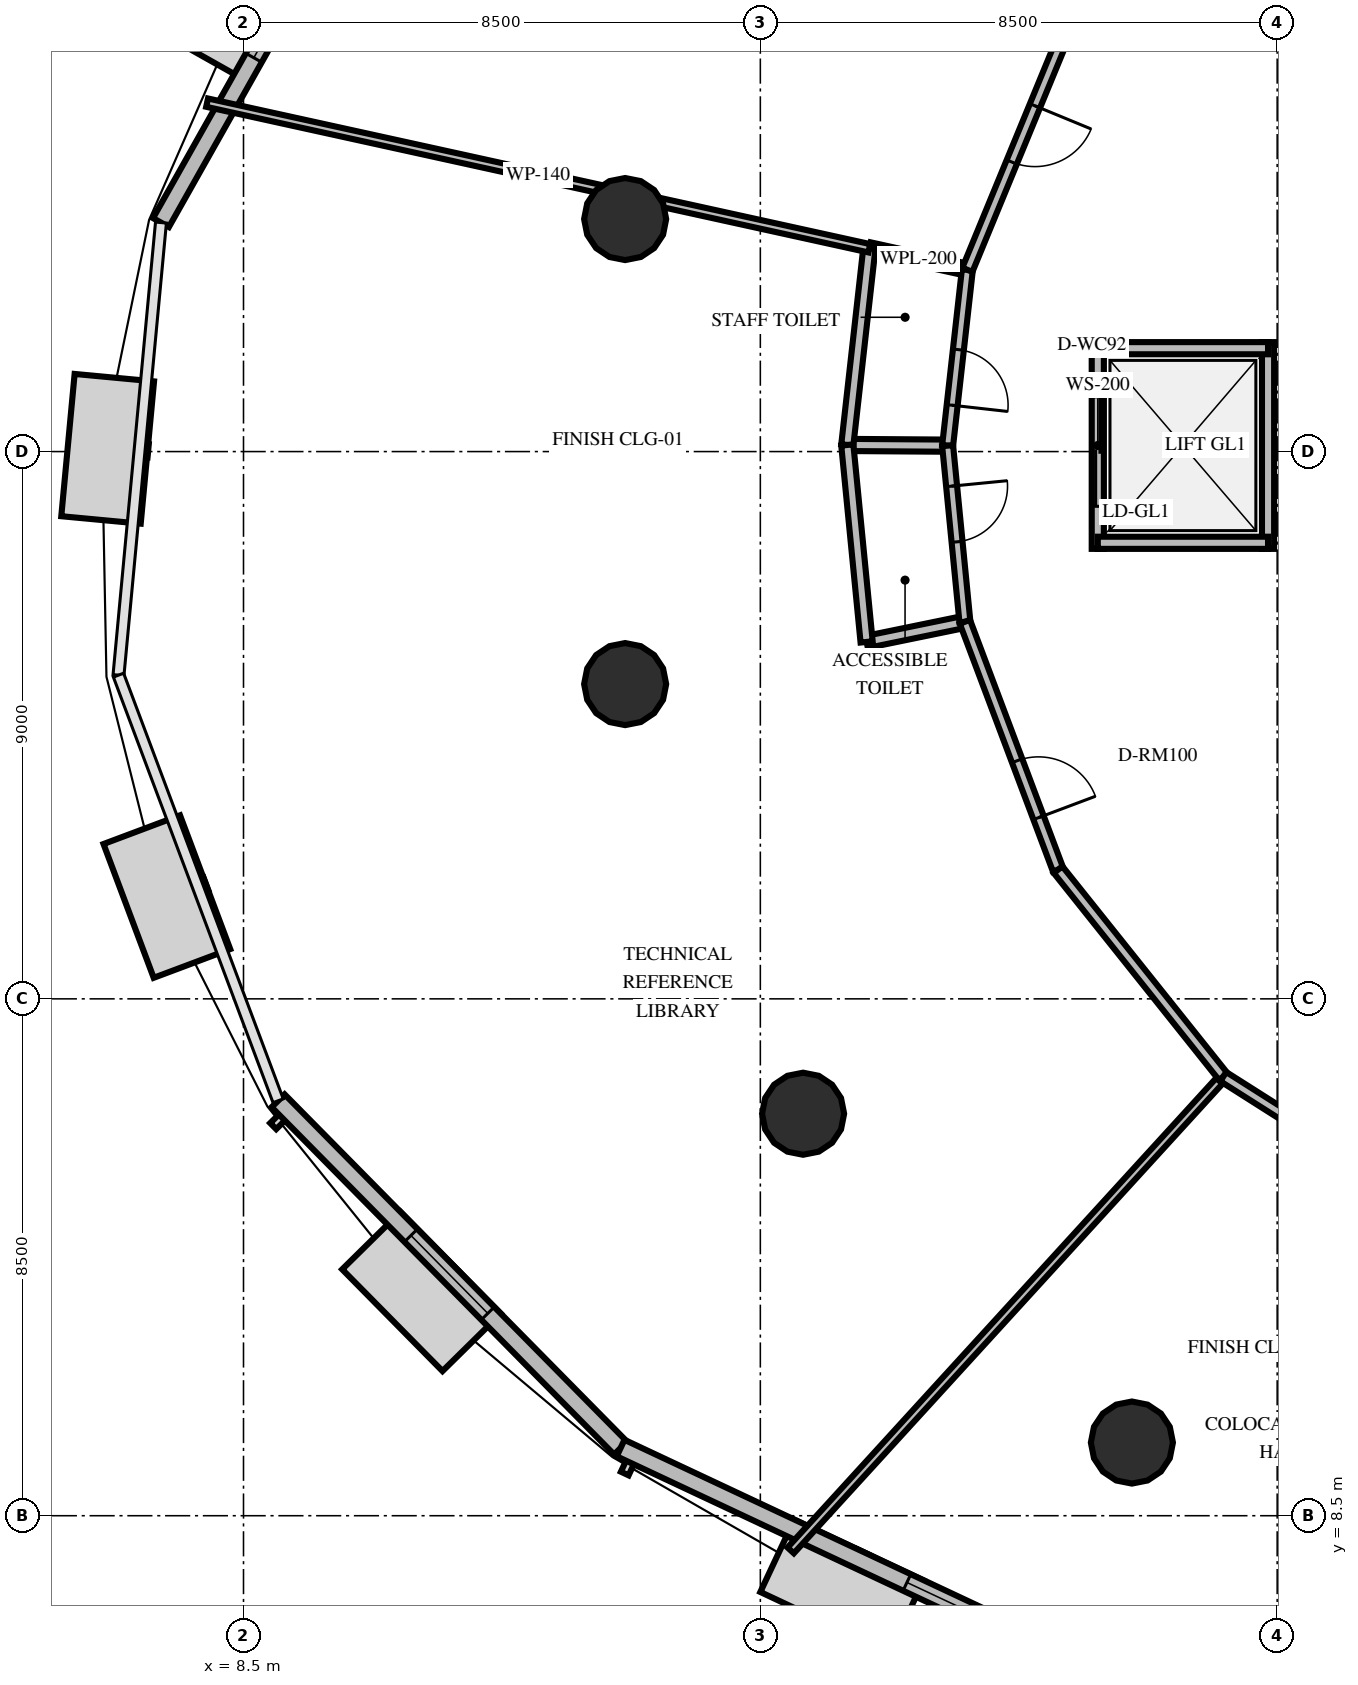
"""IFC4 building model, lengths in metres.
Left out: names, types, materials, properties, quantities, classifications, styles, units other than length and angle.
Written with IfcOpenShell. Run it as: python <this file> out.ifc"""

import sys

from ifc_helpers import new_model, si_unit, direction, frame, frame_2d, origin, origin_2d, place, context, subcontext, project, spatial, rectangle, circle, extrude, element, fill, save


model = new_model("IFC4")
c1 = context("Model", 3, precision=1e-05, world=origin(), true_north=direction((0.0, 1.0)))
c2 = subcontext(c1, "Body", "Model", "MODEL_VIEW")
j1 = project(units=[si_unit("LENGTHUNIT", "METRE"), si_unit("PLANEANGLEUNIT", "RADIAN")], contexts=[c1])
p1 = place(None, origin())
s1 = spatial("IfcSite", under=j1, at=p1, CompositionType="ELEMENT")
p2 = place(p1, origin())
s2 = spatial("IfcBuilding", under=s1, at=p2, CompositionType="ELEMENT")
p3 = place(p2, frame((0.0, 0.0, 63.6)))
s3 = spatial("IfcBuildingStorey", under=s2, at=p3, CompositionType="ELEMENT", Elevation=63.6)
for number, where, z_axis, x_axis in (
    (1, (14.777, 29.824, 0.0), (0.0, 0.0, 1.0), (1.0, 0.0, 0.0)),
    (2, (14.777, 22.176, 0.0), (0.0, 0.0, 1.0), (1.0, 0.0, 0.0)),
    (3, (17.703, 15.111, 0.0), (0.0, 0.0, 1.0), (1.0, 0.0, 0.0)),
    (4, (23.111, 9.703, 0.0), (0.0, 0.0, 1.0), (1.0, 0.0, 0.0)),
):
    element("IfcColumn", number, at=place(p3, frame(where, z_axis=z_axis, x_axis=x_axis)), inside=s3, PredefinedType="COLUMN", context=c2, shape_type="SweptSolid", body=[
        extrude(circle(Radius=0.675, at=origin_2d()), origin(), (0.0, 0.0, 1.0), 4.2),
    ])
p4 = place(p3, frame((11.08, 36.755, 0.0), z_axis=(0.0, 0.0, 1.0), x_axis=(-0.490895470353, -0.871218478446, 0.0)))
e5 = element("IfcWall", 5, at=p4, inside=s3, PredefinedType="SOLIDWALL", context=c2, shape_type="SweptSolid", body=[
    extrude(rectangle(XDim=8.021, YDim=0.3, at=frame_2d((4.011, 0.0))), origin(), (0.0, 0.0, 1.0), 3.0),
])
p5 = place(p4, frame((3.111, 0.0, 0.8)))
e6 = element("IfcOpeningElement", 6, at=p5, cuts=e5, PredefinedType="OPENING", context=c2, shape_type="SweptSolid", body=[
    extrude(rectangle(XDim=1.8, YDim=1.95, at=frame_2d((0.9, 0.975))), frame((0.0, 0.16, 0.0), z_axis=(0.0, -1.0, 0.0), x_axis=(1.0, 0.0, 0.0)), (0.0, 0.0, 1.0), 0.32),
])
p6 = place(p3, frame((9.07, 15.324, 0.0), z_axis=(0.0, 0.0, 1.0), x_axis=(0.702143738973, -0.712035230744, 0.0)))
e7 = element("IfcWall", 7, at=p6, inside=s3, PredefinedType="SOLIDWALL", context=c2, shape_type="SweptSolid", body=[
    extrude(rectangle(XDim=8.022, YDim=0.3, at=frame_2d((4.011, 0.0))), origin(), (0.0, 0.0, 1.0), 3.0),
])
p7 = place(p6, frame((3.111, 0.0, 0.8)))
e8 = element("IfcOpeningElement", 8, at=p7, cuts=e7, PredefinedType="OPENING", context=c2, shape_type="SweptSolid", body=[
    extrude(rectangle(XDim=1.8, YDim=1.95, at=frame_2d((0.9, 0.975))), frame((0.0, 0.16, 0.0), z_axis=(0.0, -1.0, 0.0), x_axis=(1.0, 0.0, 0.0)), (0.0, 0.0, 1.0), 0.32),
])
p8 = place(p3, frame((14.702, 9.612, 0.0), z_axis=(0.0, 0.0, 1.0), x_axis=(0.905289465516, -0.424795225522, 0.0)))
e9 = element("IfcWall", 9, at=p8, inside=s3, PredefinedType="SOLIDWALL", context=c2, shape_type="SweptSolid", body=[
    extrude(rectangle(XDim=8.793, YDim=0.3, at=frame_2d((4.396, 0.0))), origin(), (0.0, 0.0, 1.0), 3.0),
])
p9 = place(p8, frame((5.202, 0.0, 0.8)))
e10 = element("IfcOpeningElement", 10, at=p9, cuts=e9, PredefinedType="OPENING", context=c2, shape_type="SweptSolid", body=[
    extrude(rectangle(XDim=1.8, YDim=1.95, at=frame_2d((0.9, 0.975))), frame((0.0, 0.16, 0.0), z_axis=(0.0, -1.0, 0.0), x_axis=(1.0, 0.0, 0.0)), (0.0, 0.0, 1.0), 0.32),
])
p10 = place(p3, frame((22.55, 24.4, 0.0), z_axis=(0.0, 0.0, 1.0), x_axis=(0.0, 1.0, 0.0)))
e11 = element("IfcWall", 11, at=p10, inside=s3, PredefinedType="SOLIDWALL", context=c2, shape_type="SweptSolid", body=[
    extrude(rectangle(XDim=3.4, YDim=0.2, at=frame_2d((1.7, 0.0))), origin(), (0.0, 0.0, 1.0), 3.0),
])
p11 = place(p10, frame((0.7, 0.0, 0.0)))
e12 = element("IfcOpeningElement", 12, at=p11, cuts=e11, PredefinedType="OPENING", context=c2, shape_type="SweptSolid", body=[
    extrude(rectangle(XDim=1.8, YDim=2.4, at=frame_2d((0.9, 1.2))), frame((0.0, 0.11, 0.0), z_axis=(0.0, -1.0, 0.0), x_axis=(1.0, 0.0, 0.0)), (0.0, 0.0, 1.0), 0.22),
])
p12 = place(p3, frame((25.35, 24.4, 0.0), z_axis=(0.0, 0.0, 1.0), x_axis=(0.0, 1.0, 0.0)))
e13 = element("IfcWall", 13, at=p12, inside=s3, PredefinedType="SOLIDWALL", context=c2, shape_type="SweptSolid", body=[
    extrude(rectangle(XDim=3.4, YDim=0.2, at=frame_2d((1.7, 0.0))), origin(), (0.0, 0.0, 1.0), 3.0),
])
for number, where, z_axis, x_axis in (
    (14, (22.55, 24.5, 0.0), (0.0, 0.0, 1.0), (1.0, 0.0, 0.0)),
    (15, (22.55, 27.7, 0.0), (0.0, 0.0, 1.0), (1.0, 0.0, 0.0)),
):
    element("IfcWall", number, at=place(p3, frame(where, z_axis=z_axis, x_axis=x_axis)), inside=s3, PredefinedType="SOLIDWALL", context=c2, shape_type="SweptSolid", body=[
        extrude(rectangle(XDim=2.8, YDim=0.2, at=frame_2d((1.4, 0.0))), origin(), (0.0, 0.0, 1.0), 3.0),
    ])
p13 = place(p3, frame((20.405, 28.989, 0.0), z_axis=(0.0, 0.0, 1.0), x_axis=(-0.976651296643, 0.21483073515, 0.0)))
e16 = element("IfcWall", 16, at=p13, inside=s3, PredefinedType="PLUMBINGWALL", context=c2, shape_type="SweptSolid", body=[
    extrude(rectangle(XDim=1.65, YDim=0.2, at=frame_2d((0.825, 0.0))), origin(), (0.0, 0.0, 1.0), 3.0),
])
p14 = place(p3, frame((20.08, 26.097, 0.0), z_axis=(0.0, 0.0, 1.0), x_axis=(-0.99997581681, 0.006954552144, 0.0)))
e17 = element("IfcWall", 17, at=p14, inside=s3, PredefinedType="PLUMBINGWALL", context=c2, shape_type="SweptSolid", body=[
    extrude(rectangle(XDim=1.65, YDim=0.2, at=frame_2d((0.825, 0.0))), origin(), (0.0, 0.0, 1.0), 3.0),
])
p15 = place(p3, frame((18.793, 29.344, 0.0), z_axis=(0.0, 0.0, 1.0), x_axis=(-0.111452219872, -0.993769793607, 0.0)))
e18 = element("IfcWall", 18, at=p15, inside=s3, PredefinedType="PLUMBINGWALL", context=c2, shape_type="SweptSolid", body=[
    extrude(rectangle(XDim=3.255, YDim=0.2, at=frame_2d((1.627, 0.0))), origin(), (0.0, 0.0, 1.0), 3.0),
])
p16 = place(p3, frame((20.405, 28.989, 0.0), z_axis=(0.0, 0.0, 1.0), x_axis=(-0.111499619196, -0.993764476583, 0.0)))
e19 = element("IfcWall", 19, at=p16, inside=s3, PredefinedType="PARTITIONING", context=c2, shape_type="SweptSolid", body=[
    extrude(rectangle(XDim=2.91, YDim=0.18, at=frame_2d((1.455, 0.0))), origin(), (0.0, 0.0, 1.0), 3.0),
])
p17 = place(p16, frame((1.321, 0.0, 0.0)))
e20 = element("IfcOpeningElement", 20, at=p17, cuts=e19, PredefinedType="OPENING", context=c2, shape_type="SweptSolid", body=[
    extrude(rectangle(XDim=0.92, YDim=2.1, at=frame_2d((0.46, 1.05))), frame((0.0, 0.1, 0.0), z_axis=(0.0, -1.0, 0.0), x_axis=(1.0, 0.0, 0.0)), (0.0, 0.0, 1.0), 0.2),
])
p18 = place(p3, frame((20.364, 23.201, 0.0), z_axis=(0.0, 0.0, 1.0), x_axis=(-0.979572068013, -0.201093420004, 0.0)))
e21 = element("IfcWall", 21, at=p18, inside=s3, PredefinedType="PLUMBINGWALL", context=c2, shape_type="SweptSolid", body=[
    extrude(rectangle(XDim=1.65, YDim=0.2, at=frame_2d((0.825, 0.0))), origin(), (0.0, 0.0, 1.0), 3.0),
])
p19 = place(p3, frame((18.43, 26.109, 0.0), z_axis=(0.0, 0.0, 1.0), x_axis=(0.097580164018, -0.99522766822, 0.0)))
e22 = element("IfcWall", 22, at=p19, inside=s3, PredefinedType="PLUMBINGWALL", context=c2, shape_type="SweptSolid", body=[
    extrude(rectangle(XDim=3.255, YDim=0.2, at=frame_2d((1.627, 0.0))), origin(), (0.0, 0.0, 1.0), 3.0),
])
p20 = place(p3, frame((20.08, 26.097, 0.0), z_axis=(0.0, 0.0, 1.0), x_axis=(0.09756816541, -0.995228844587, 0.0)))
e23 = element("IfcWall", 23, at=p20, inside=s3, PredefinedType="PARTITIONING", context=c2, shape_type="SweptSolid", body=[
    extrude(rectangle(XDim=2.91, YDim=0.18, at=frame_2d((1.455, 0.0))), origin(), (0.0, 0.0, 1.0), 3.0),
])
p21 = place(p20, frame((0.669, 0.0, 0.0)))
e24 = element("IfcOpeningElement", 24, at=p21, cuts=e23, PredefinedType="OPENING", context=c2, shape_type="SweptSolid", body=[
    extrude(rectangle(XDim=0.92, YDim=2.1, at=frame_2d((0.46, 1.05))), frame((0.0, 0.1, 0.0), z_axis=(0.0, -1.0, 0.0), x_axis=(1.0, 0.0, 0.0)), (0.0, 0.0, 1.0), 0.2),
])
p22 = place(p3, frame((18.793, 29.344, 0.0), z_axis=(0.0, 0.0, 1.0), x_axis=(-0.976672388843, 0.214734824543, 0.0)))
e25 = element("IfcWall", 25, at=p22, inside=s3, PredefinedType="PARTITIONING", context=c2, shape_type="SweptSolid", body=[
    extrude(rectangle(XDim=11.152, YDim=0.14, at=frame_2d((5.576, 0.0))), origin(), (0.0, 0.0, 1.0), 3.0),
])
p23 = place(p3, frame((24.614, 15.721, 0.0), z_axis=(0.0, 0.0, 1.0), x_axis=(-0.67430667382, -0.738451426731, 0.0)))
e26 = element("IfcWall", 26, at=p23, inside=s3, PredefinedType="PARTITIONING", context=c2, shape_type="SweptSolid", body=[
    extrude(rectangle(XDim=10.551, YDim=0.14, at=frame_2d((5.275, 0.0))), origin(), (0.0, 0.0, 1.0), 3.0),
])
p24 = place(p3, frame((20.364, 23.201, 0.0), z_axis=(0.0, 0.0, 1.0), x_axis=(0.351823691742, -0.936066285008, 0.0)))
e27 = element("IfcWall", 27, at=p24, inside=s3, PredefinedType="PARTITIONING", context=c2, shape_type="SweptSolid", body=[
    extrude(rectangle(XDim=4.355, YDim=0.18, at=frame_2d((2.177, 0.0))), origin(), (0.0, 0.0, 1.0), 3.0),
])
p25 = place(p24, frame((2.441, 0.0, 0.0)))
e28 = element("IfcOpeningElement", 28, at=p25, cuts=e27, PredefinedType="OPENING", context=c2, shape_type="SweptSolid", body=[
    extrude(rectangle(XDim=1.0, YDim=2.15, at=frame_2d((0.5, 1.075))), frame((0.0, 0.1, 0.0), z_axis=(0.0, -1.0, 0.0), x_axis=(1.0, 0.0, 0.0)), (0.0, 0.0, 1.0), 0.2),
])
p26 = place(p3, frame((21.896, 19.124, 0.0), z_axis=(0.0, 0.0, 1.0), x_axis=(0.623915406168, -0.781491884761, 0.0)))
e29 = element("IfcWall", 29, at=p26, inside=s3, PredefinedType="PARTITIONING", context=c2, shape_type="SweptSolid", body=[
    extrude(rectangle(XDim=4.355, YDim=0.18, at=frame_2d((2.178, 0.0))), origin(), (0.0, 0.0, 1.0), 3.0),
])
p27 = place(p3, frame((24.614, 15.721, 0.0), z_axis=(0.0, 0.0, 1.0), x_axis=(0.844332495787, -0.535819593295, 0.0)))
e30 = element("IfcWall", 30, at=p27, inside=s3, PredefinedType="PARTITIONING", context=c2, shape_type="SweptSolid", body=[
    extrude(rectangle(XDim=4.834, YDim=0.18, at=frame_2d((2.417, 0.0))), origin(), (0.0, 0.0, 1.0), 3.0),
])
p28 = place(p3, frame((22.247, 33.459, 0.0), z_axis=(0.0, 0.0, 1.0), x_axis=(-0.381069812318, -0.92454626609, 0.0)))
e31 = element("IfcWall", 31, at=p28, inside=s3, PredefinedType="PARTITIONING", context=c2, shape_type="SweptSolid", body=[
    extrude(rectangle(XDim=4.834, YDim=0.18, at=frame_2d((2.417, 0.0))), origin(), (0.0, 0.0, 1.0), 3.0),
])
p29 = place(p28, frame((1.917, 0.0, 0.0)))
e32 = element("IfcOpeningElement", 32, at=p29, cuts=e31, PredefinedType="OPENING", context=c2, shape_type="SweptSolid", body=[
    extrude(rectangle(XDim=1.0, YDim=2.15, at=frame_2d((0.5, 1.075))), frame((0.0, 0.1, 0.0), z_axis=(0.0, -1.0, 0.0), x_axis=(1.0, 0.0, 0.0)), (0.0, 0.0, 1.0), 0.2),
])
p30 = place(p5, origin())
e33 = element("IfcWindow", 33, at=p30, inside=s3, PartitioningType="SINGLE_PANEL", PredefinedType="WINDOW", context=c2, shape_type="SweptSolid", body=[
    extrude(rectangle(XDim=1.8, YDim=1.95, at=frame_2d((0.9, 0.975))), frame((0.0, 0.03, 0.0), z_axis=(0.0, -1.0, 0.0), x_axis=(1.0, 0.0, 0.0)), (0.0, 0.0, 1.0), 0.06),
])
fill(e6, e33)
p31 = place(p7, origin())
e34 = element("IfcWindow", 34, at=p31, inside=s3, PartitioningType="SINGLE_PANEL", PredefinedType="WINDOW", context=c2, shape_type="SweptSolid", body=[
    extrude(rectangle(XDim=1.8, YDim=1.95, at=frame_2d((0.9, 0.975))), frame((0.0, 0.03, 0.0), z_axis=(0.0, -1.0, 0.0), x_axis=(1.0, 0.0, 0.0)), (0.0, 0.0, 1.0), 0.06),
])
fill(e8, e34)
p32 = place(p9, origin())
e35 = element("IfcWindow", 35, at=p32, inside=s3, PartitioningType="SINGLE_PANEL", PredefinedType="WINDOW", context=c2, shape_type="SweptSolid", body=[
    extrude(rectangle(XDim=1.8, YDim=1.95, at=frame_2d((0.9, 0.975))), frame((0.0, 0.03, 0.0), z_axis=(0.0, -1.0, 0.0), x_axis=(1.0, 0.0, 0.0)), (0.0, 0.0, 1.0), 0.06),
])
fill(e10, e35)
p33 = place(p11, origin())
e36 = element("IfcDoor", 36, at=p33, inside=s3, OperationType="DOUBLE_DOOR_SLIDING", PredefinedType="USERDEFINED", context=c2, shape_type="SweptSolid", body=[
    extrude(rectangle(XDim=1.8, YDim=2.4, at=frame_2d((0.9, 1.2))), frame((0.0, 0.025, 0.0), z_axis=(0.0, -1.0, 0.0), x_axis=(1.0, 0.0, 0.0)), (0.0, 0.0, 1.0), 0.05),
])
fill(e12, e36)
p34 = place(p17, origin())
e37 = element("IfcDoor", 37, at=p34, inside=s3, OperationType="SINGLE_SWING_RIGHT", PredefinedType="DOOR", context=c2, shape_type="SweptSolid", body=[
    extrude(rectangle(XDim=0.92, YDim=2.1, at=frame_2d((0.46, 1.05))), frame((0.0, 0.025, 0.0), z_axis=(0.0, -1.0, 0.0), x_axis=(1.0, 0.0, 0.0)), (0.0, 0.0, 1.0), 0.05),
])
fill(e20, e37)
p35 = place(p21, origin())
e38 = element("IfcDoor", 38, at=p35, inside=s3, OperationType="SINGLE_SWING_LEFT", PredefinedType="DOOR", context=c2, shape_type="SweptSolid", body=[
    extrude(rectangle(XDim=0.92, YDim=2.1, at=frame_2d((0.46, 1.05))), frame((0.0, 0.025, 0.0), z_axis=(0.0, -1.0, 0.0), x_axis=(1.0, 0.0, 0.0)), (0.0, 0.0, 1.0), 0.05),
])
fill(e24, e38)
p36 = place(p25, origin())
e39 = element("IfcDoor", 39, at=p36, inside=s3, OperationType="SINGLE_SWING_RIGHT", PredefinedType="DOOR", context=c2, shape_type="SweptSolid", body=[
    extrude(rectangle(XDim=1.0, YDim=2.15, at=frame_2d((0.5, 1.075))), frame((0.0, 0.025, 0.0), z_axis=(0.0, -1.0, 0.0), x_axis=(1.0, 0.0, 0.0)), (0.0, 0.0, 1.0), 0.05),
])
fill(e28, e39)
p37 = place(p29, origin())
e40 = element("IfcDoor", 40, at=p37, inside=s3, OperationType="SINGLE_SWING_LEFT", PredefinedType="DOOR", context=c2, shape_type="SweptSolid", body=[
    extrude(rectangle(XDim=1.0, YDim=2.15, at=frame_2d((0.5, 1.075))), frame((0.0, 0.025, 0.0), z_axis=(0.0, -1.0, 0.0), x_axis=(1.0, 0.0, 0.0)), (0.0, 0.0, 1.0), 0.05),
])
fill(e32, e40)
save(model, sys.argv[1])
